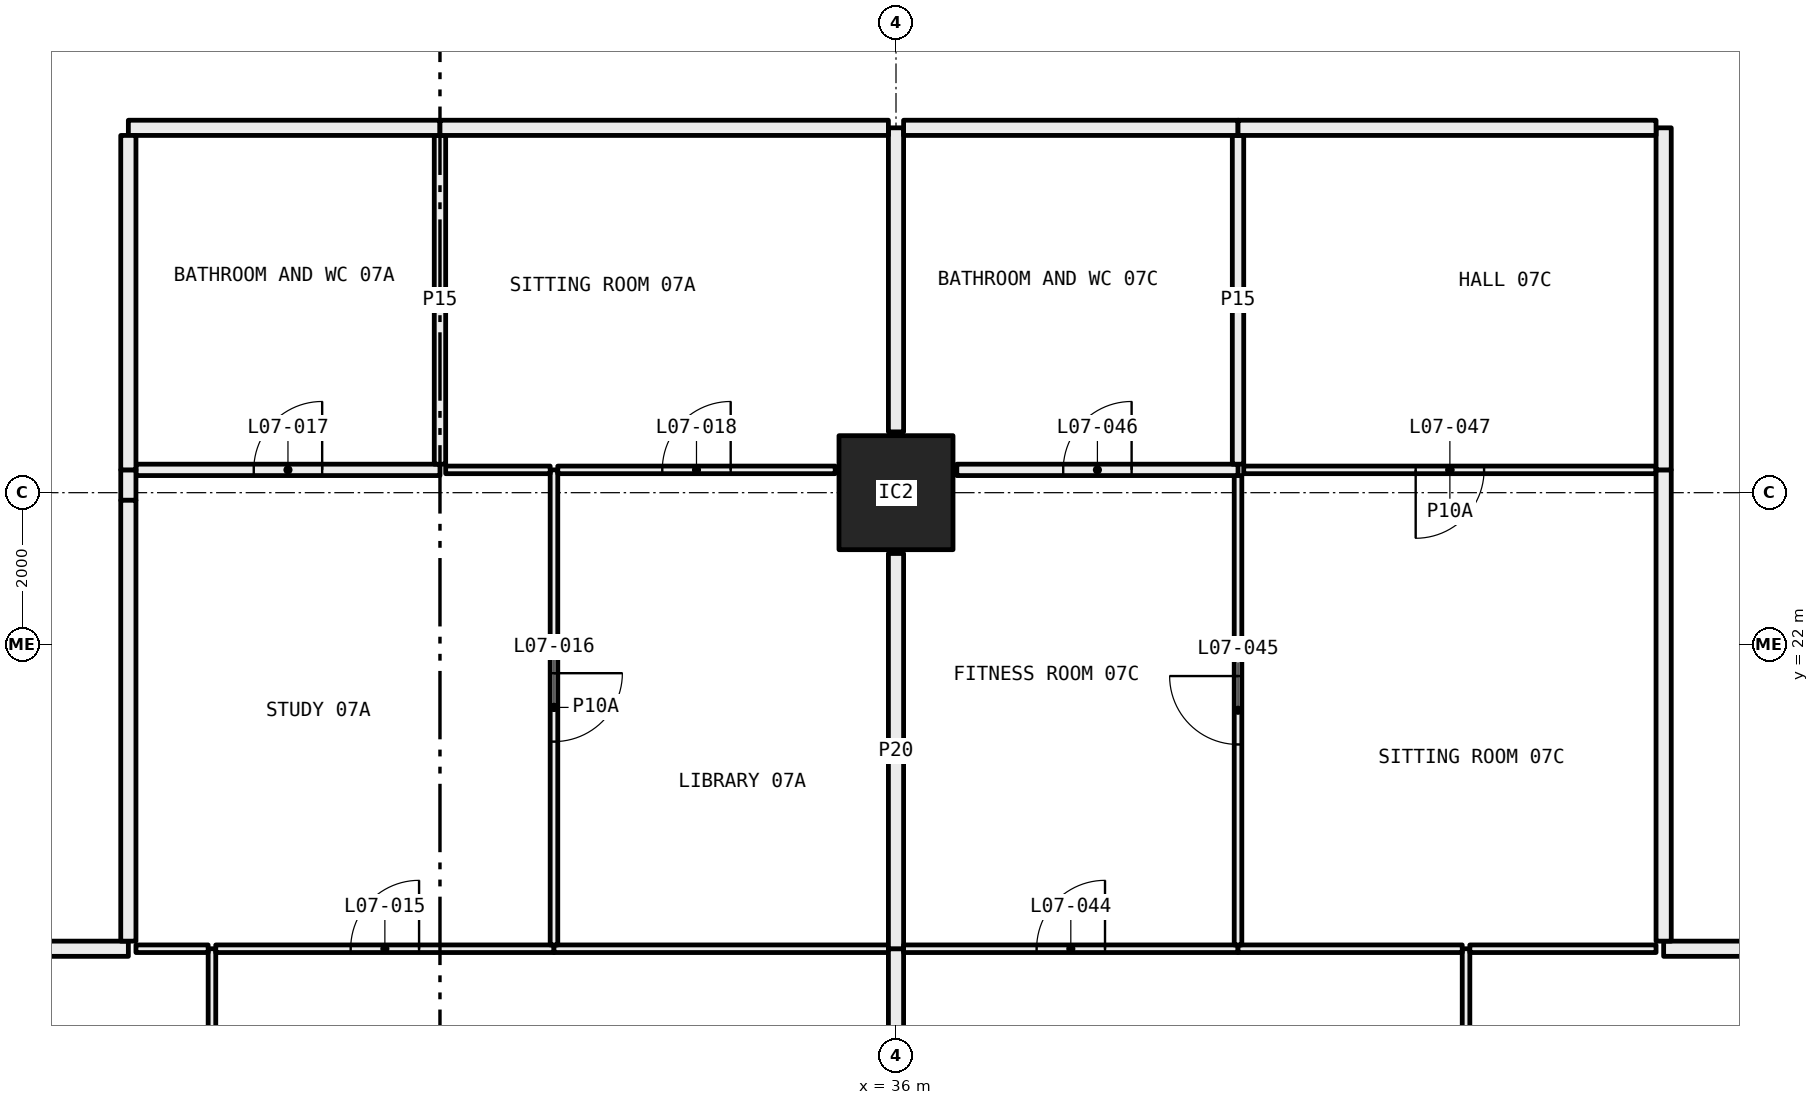
"""IFC4 building model, lengths in metres.
Left out: names, types, materials, properties, quantities, classifications, styles, units other than length and angle.
Written with IfcOpenShell. Run it as: python <this file> out.ifc"""

import sys

from ifc_helpers import new_model, si_unit, direction, frame, frame_2d, origin, origin_2d, place, context, subcontext, project, spatial, rectangle, hollow_rectangle, extrude, element, fill, save


model = new_model("IFC4")
c1 = context("Model", 3, precision=1e-05, world=origin(), true_north=direction((0.0, 1.0)))
c2 = subcontext(c1, "Body", "Model", "MODEL_VIEW")
j1 = project(units=[si_unit("LENGTHUNIT", "METRE"), si_unit("PLANEANGLEUNIT", "RADIAN")], contexts=[c1])
p1 = place(None, origin())
s1 = spatial("IfcSite", under=j1, at=p1, CompositionType="ELEMENT")
p2 = place(p1, origin())
s2 = spatial("IfcBuilding", under=s1, at=p2, CompositionType="ELEMENT")
p3 = place(p2, frame((0.0, 0.0, 36.9)))
s3 = spatial("IfcBuildingStorey", under=s2, at=p3, CompositionType="ELEMENT", Elevation=36.9)
p4 = place(p3, frame((36.0, 24.0, 0.0), z_axis=(0.0, 0.0, 1.0), x_axis=(1.0, 0.0, 0.0)))
e1 = element("IfcColumn", 1, at=p4, inside=s3, PredefinedType="COLUMN", context=c2, shape_type="SweptSolid", body=[
    extrude(hollow_rectangle(XDim=1.5, YDim=1.5, WallThickness=0.065, at=origin_2d()), origin(), (0.0, 0.0, 1.0), 3.05),
])
p5 = place(p3, frame((27.0, 12.05, 0.0), z_axis=(0.0, 0.0, 1.0), x_axis=(0.0, 1.0, 0.0)))
e2 = element("IfcWall", 2, at=p5, inside=s3, PredefinedType="PARTITIONING", context=c2, shape_type="SweptSolid", body=[
    extrude(rectangle(XDim=5.95, YDim=0.1, at=frame_2d((2.975, 0.0))), origin(), (0.0, 0.0, 1.0), 2.45),
])
p6 = place(p3, frame((26.95, 18.0, 0.0), z_axis=(0.0, 0.0, 1.0), x_axis=(-1.0, 0.0, 0.0)))
e3 = element("IfcWall", 3, at=p6, inside=s3, PredefinedType="PARTITIONING", context=c2, shape_type="SweptSolid", body=[
    extrude(rectangle(XDim=0.95, YDim=0.1, at=frame_2d((0.475, 0.0))), origin(), (0.0, 0.0, 1.0), 3.05),
])
p7 = place(p3, frame((25.9, 18.0, 0.0), z_axis=(0.0, 0.0, 1.0), x_axis=(-1.0, 0.0, 0.0)))
e4 = element("IfcWall", 4, at=p7, inside=s3, PredefinedType="PARTITIONING", context=c2, shape_type="SweptSolid", body=[
    extrude(rectangle(XDim=7.9, YDim=0.2, at=frame_2d((3.95, 0.0))), origin(), (0.0, 0.0, 1.0), 3.05),
])
p8 = place(p3, frame((31.5, 18.0, 0.0), z_axis=(0.0, 0.0, 1.0), x_axis=(-1.0, 0.0, 0.0)))
e5 = element("IfcWall", 5, at=p8, inside=s3, PredefinedType="PARTITIONING", context=c2, shape_type="SweptSolid", body=[
    extrude(rectangle(XDim=4.45, YDim=0.1, at=frame_2d((2.225, 0.0))), origin(), (0.0, 0.0, 1.0), 3.05),
])
p9 = place(p8, frame((1.775, 0.0, 0.0)))
e6 = element("IfcOpeningElement", 6, at=p9, cuts=e5, PredefinedType="OPENING", context=c2, shape_type="SweptSolid", body=[
    extrude(rectangle(XDim=0.9, YDim=2.1, at=frame_2d((0.45, 1.05))), frame((0.0, 0.06, 0.0), z_axis=(0.0, -1.0, 0.0), x_axis=(1.0, 0.0, 0.0)), (0.0, 0.0, 1.0), 0.12),
])
p10 = place(p3, frame((35.9, 18.0, 0.0), z_axis=(0.0, 0.0, 1.0), x_axis=(-1.0, 0.0, 0.0)))
e7 = element("IfcWall", 7, at=p10, inside=s3, PredefinedType="PARTITIONING", context=c2, shape_type="SweptSolid", body=[
    extrude(rectangle(XDim=4.4, YDim=0.1, at=frame_2d((2.2, 0.0))), origin(), (0.0, 0.0, 1.0), 3.05),
])
p11 = place(p3, frame((36.0, 12.8, 0.0), z_axis=(0.0, 0.0, 1.0), x_axis=(0.0, 1.0, 0.0)))
e8 = element("IfcWall", 8, at=p11, inside=s3, PredefinedType="PARTITIONING", context=c2, shape_type="SweptSolid", body=[
    extrude(rectangle(XDim=5.2, YDim=0.2, at=frame_2d((2.6, 0.0))), origin(), (0.0, 0.0, 1.0), 2.45),
])
p12 = place(p3, frame((31.5, 18.05, 0.0), z_axis=(0.0, 0.0, 1.0), x_axis=(0.0, 1.0, 0.0)))
e9 = element("IfcWall", 9, at=p12, inside=s3, PredefinedType="PARTITIONING", context=c2, shape_type="SweptSolid", body=[
    extrude(rectangle(XDim=6.25, YDim=0.1, at=frame_2d((3.125, 0.0))), origin(), (0.0, 0.0, 1.0), 2.45),
])
p13 = place(p12, frame((2.675, 0.0, 0.0)))
e10 = element("IfcOpeningElement", 10, at=p13, cuts=e9, PredefinedType="OPENING", context=c2, shape_type="SweptSolid", body=[
    extrude(rectangle(XDim=0.9, YDim=2.1, at=frame_2d((0.45, 1.05))), frame((0.0, 0.06, 0.0), z_axis=(0.0, -1.0, 0.0), x_axis=(1.0, 0.0, 0.0)), (0.0, 0.0, 1.0), 0.12),
])
p14 = place(p3, frame((30.0, 24.3, 0.0), z_axis=(0.0, 0.0, 1.0), x_axis=(-1.0, 0.0, 0.0)))
e11 = element("IfcWall", 11, at=p14, inside=s3, PredefinedType="PARTITIONING", context=c2, shape_type="SweptSolid", body=[
    extrude(rectangle(XDim=4.0, YDim=0.15, at=frame_2d((2.0, 0.0))), origin(), (0.0, 0.0, 1.0), 3.05),
])
p15 = place(p14, frame((1.55, 0.0, 0.0)))
e12 = element("IfcOpeningElement", 12, at=p15, cuts=e11, PredefinedType="OPENING", context=c2, shape_type="SweptSolid", body=[
    extrude(rectangle(XDim=0.9, YDim=2.1, at=frame_2d((0.45, 1.05))), frame((0.0, 0.085, 0.0), z_axis=(0.0, -1.0, 0.0), x_axis=(1.0, 0.0, 0.0)), (0.0, 0.0, 1.0), 0.17),
])
p16 = place(p3, frame((31.45, 24.3, 0.0), z_axis=(0.0, 0.0, 1.0), x_axis=(-1.0, 0.0, 0.0)))
e13 = element("IfcWall", 13, at=p16, inside=s3, PredefinedType="PARTITIONING", context=c2, shape_type="SweptSolid", body=[
    extrude(rectangle(XDim=1.375, YDim=0.1, at=frame_2d((0.688, 0.0))), origin(), (0.0, 0.0, 1.0), 3.05),
])
p17 = place(p3, frame((25.9, 24.3, 0.0), z_axis=(0.0, 0.0, 1.0), x_axis=(0.0, -1.0, 0.0)))
e14 = element("IfcWall", 14, at=p17, inside=s3, PredefinedType="PARTITIONING", context=c2, shape_type="SweptSolid", body=[
    extrude(rectangle(XDim=0.4, YDim=0.2, at=frame_2d((0.2, 0.0))), origin(), (0.0, 0.0, 1.0), 2.45),
])
p18 = place(p3, frame((25.9, 23.9, 0.0), z_axis=(0.0, 0.0, 1.0), x_axis=(0.0, -1.0, 0.0)))
e15 = element("IfcWall", 15, at=p18, inside=s3, PredefinedType="PARTITIONING", context=c2, shape_type="SweptSolid", body=[
    extrude(rectangle(XDim=5.8, YDim=0.2, at=frame_2d((2.9, 0.0))), origin(), (0.0, 0.0, 1.0), 3.05),
])
p19 = place(p3, frame((35.2, 24.3, 0.0), z_axis=(0.0, 0.0, 1.0), x_axis=(-1.0, 0.0, 0.0)))
e16 = element("IfcWall", 16, at=p19, inside=s3, PredefinedType="PARTITIONING", context=c2, shape_type="SweptSolid", body=[
    extrude(rectangle(XDim=3.65, YDim=0.1, at=frame_2d((1.825, 0.0))), origin(), (0.0, 0.0, 1.0), 3.05),
])
p20 = place(p19, frame((1.375, 0.0, 0.0)))
e17 = element("IfcOpeningElement", 17, at=p20, cuts=e16, PredefinedType="OPENING", context=c2, shape_type="SweptSolid", body=[
    extrude(rectangle(XDim=0.9, YDim=2.1, at=frame_2d((0.45, 1.05))), frame((0.0, 0.06, 0.0), z_axis=(0.0, -1.0, 0.0), x_axis=(1.0, 0.0, 0.0)), (0.0, 0.0, 1.0), 0.12),
])
p21 = place(p3, frame((36.0, 18.0, 0.0), z_axis=(0.0, 0.0, 1.0), x_axis=(0.0, 1.0, 0.0)))
e18 = element("IfcWall", 18, at=p21, inside=s3, PredefinedType="PARTITIONING", context=c2, shape_type="SweptSolid", body=[
    extrude(rectangle(XDim=5.2, YDim=0.2, at=frame_2d((2.6, 0.0))), origin(), (0.0, 0.0, 1.0), 2.45),
])
p22 = place(p3, frame((30.0, 24.375, 0.0), z_axis=(0.0, 0.0, 1.0), x_axis=(0.0, 1.0, 0.0)))
e19 = element("IfcWall", 19, at=p22, inside=s3, PredefinedType="PARTITIONING", context=c2, shape_type="SweptSolid", body=[
    extrude(rectangle(XDim=4.325, YDim=0.15, at=frame_2d((2.163, 0.0))), origin(), (0.0, 0.0, 1.0), 3.05),
])
p23 = place(p3, frame((30.0, 28.8, 0.0), z_axis=(0.0, 0.0, 1.0), x_axis=(-1.0, 0.0, 0.0)))
e20 = element("IfcWall", 20, at=p23, inside=s3, PredefinedType="PARTITIONING", context=c2, shape_type="SweptSolid", body=[
    extrude(rectangle(XDim=4.1, YDim=0.2, at=frame_2d((2.05, 0.0))), origin(), (0.0, 0.0, 1.0), 3.05),
])
p24 = place(p3, frame((25.9, 28.7, 0.0), z_axis=(0.0, 0.0, 1.0), x_axis=(0.0, -1.0, 0.0)))
e21 = element("IfcWall", 21, at=p24, inside=s3, PredefinedType="PARTITIONING", context=c2, shape_type="SweptSolid", body=[
    extrude(rectangle(XDim=4.4, YDim=0.2, at=frame_2d((2.2, 0.0))), origin(), (0.0, 0.0, 1.0), 3.05),
])
p25 = place(p3, frame((36.0, 24.8, 0.0), z_axis=(0.0, 0.0, 1.0), x_axis=(0.0, 1.0, 0.0)))
e22 = element("IfcWall", 22, at=p25, inside=s3, PredefinedType="PARTITIONING", context=c2, shape_type="SweptSolid", body=[
    extrude(rectangle(XDim=4.0, YDim=0.2, at=frame_2d((2.0, 0.0))), origin(), (0.0, 0.0, 1.0), 2.45),
])
p26 = place(p3, frame((35.9, 28.8, 0.0), z_axis=(0.0, 0.0, 1.0), x_axis=(-1.0, 0.0, 0.0)))
e23 = element("IfcWall", 23, at=p26, inside=s3, PredefinedType="PARTITIONING", context=c2, shape_type="SweptSolid", body=[
    extrude(rectangle(XDim=5.9, YDim=0.2, at=frame_2d((2.95, 0.0))), origin(), (0.0, 0.0, 1.0), 3.05),
])
p27 = place(p3, frame((43.5, 12.05, 0.0), z_axis=(0.0, 0.0, 1.0), x_axis=(0.0, 1.0, 0.0)))
e24 = element("IfcWall", 24, at=p27, inside=s3, PredefinedType="PARTITIONING", context=c2, shape_type="SweptSolid", body=[
    extrude(rectangle(XDim=5.95, YDim=0.1, at=frame_2d((2.975, 0.0))), origin(), (0.0, 0.0, 1.0), 2.45),
])
p28 = place(p3, frame((40.5, 18.0, 0.0), z_axis=(0.0, 0.0, 1.0), x_axis=(-1.0, 0.0, 0.0)))
e25 = element("IfcWall", 25, at=p28, inside=s3, PredefinedType="PARTITIONING", context=c2, shape_type="SweptSolid", body=[
    extrude(rectangle(XDim=4.4, YDim=0.1, at=frame_2d((2.2, 0.0))), origin(), (0.0, 0.0, 1.0), 3.05),
])
p29 = place(p28, frame((1.75, 0.0, 0.0)))
e26 = element("IfcOpeningElement", 26, at=p29, cuts=e25, PredefinedType="OPENING", context=c2, shape_type="SweptSolid", body=[
    extrude(rectangle(XDim=0.9, YDim=2.1, at=frame_2d((0.45, 1.05))), frame((0.0, 0.06, 0.0), z_axis=(0.0, -1.0, 0.0), x_axis=(1.0, 0.0, 0.0)), (0.0, 0.0, 1.0), 0.12),
])
p30 = place(p3, frame((43.45, 18.0, 0.0), z_axis=(0.0, 0.0, 1.0), x_axis=(-1.0, 0.0, 0.0)))
e27 = element("IfcWall", 27, at=p30, inside=s3, PredefinedType="PARTITIONING", context=c2, shape_type="SweptSolid", body=[
    extrude(rectangle(XDim=2.95, YDim=0.1, at=frame_2d((1.475, 0.0))), origin(), (0.0, 0.0, 1.0), 3.05),
])
p31 = place(p3, frame((46.0, 18.0, 0.0), z_axis=(0.0, 0.0, 1.0), x_axis=(-1.0, 0.0, 0.0)))
e28 = element("IfcWall", 28, at=p31, inside=s3, PredefinedType="PARTITIONING", context=c2, shape_type="SweptSolid", body=[
    extrude(rectangle(XDim=2.45, YDim=0.1, at=frame_2d((1.225, 0.0))), origin(), (0.0, 0.0, 1.0), 3.05),
])
p32 = place(p3, frame((51.0, 18.0, 0.0), z_axis=(0.0, 0.0, 1.0), x_axis=(-1.0, 0.0, 0.0)))
e29 = element("IfcWall", 29, at=p32, inside=s3, PredefinedType="PARTITIONING", context=c2, shape_type="SweptSolid", body=[
    extrude(rectangle(XDim=4.9, YDim=0.2, at=frame_2d((2.45, 0.0))), origin(), (0.0, 0.0, 1.0), 3.05),
])
p33 = place(p3, frame((40.5, 18.05, 0.0), z_axis=(0.0, 0.0, 1.0), x_axis=(0.0, 1.0, 0.0)))
e30 = element("IfcWall", 30, at=p33, inside=s3, PredefinedType="PARTITIONING", context=c2, shape_type="SweptSolid", body=[
    extrude(rectangle(XDim=6.175, YDim=0.1, at=frame_2d((3.087, 0.0))), origin(), (0.0, 0.0, 1.0), 2.45),
])
p34 = place(p33, frame((2.637, 0.0, 0.0)))
e31 = element("IfcOpeningElement", 31, at=p34, cuts=e30, PredefinedType="OPENING", context=c2, shape_type="SweptSolid", body=[
    extrude(rectangle(XDim=0.9, YDim=2.1, at=frame_2d((0.45, 1.05))), frame((0.0, 0.06, 0.0), z_axis=(0.0, -1.0, 0.0), x_axis=(1.0, 0.0, 0.0)), (0.0, 0.0, 1.0), 0.12),
])
p35 = place(p3, frame((40.5, 24.3, 0.0), z_axis=(0.0, 0.0, 1.0), x_axis=(-1.0, 0.0, 0.0)))
e32 = element("IfcWall", 32, at=p35, inside=s3, PredefinedType="PARTITIONING", context=c2, shape_type="SweptSolid", body=[
    extrude(rectangle(XDim=3.7, YDim=0.15, at=frame_2d((1.85, 0.0))), origin(), (0.0, 0.0, 1.0), 3.05),
])
p36 = place(p35, frame((1.4, 0.0, 0.0)))
e33 = element("IfcOpeningElement", 33, at=p36, cuts=e32, PredefinedType="OPENING", context=c2, shape_type="SweptSolid", body=[
    extrude(rectangle(XDim=0.9, YDim=2.1, at=frame_2d((0.45, 1.05))), frame((0.0, 0.085, 0.0), z_axis=(0.0, -1.0, 0.0), x_axis=(1.0, 0.0, 0.0)), (0.0, 0.0, 1.0), 0.17),
])
p37 = place(p3, frame((46.0, 24.3, 0.0), z_axis=(0.0, 0.0, 1.0), x_axis=(-1.0, 0.0, 0.0)))
e34 = element("IfcWall", 34, at=p37, inside=s3, PredefinedType="PARTITIONING", context=c2, shape_type="SweptSolid", body=[
    extrude(rectangle(XDim=5.425, YDim=0.1, at=frame_2d((2.712, 0.0))), origin(), (0.0, 0.0, 1.0), 3.05),
])
p38 = place(p37, frame((2.262, 0.0, 0.0)))
e35 = element("IfcOpeningElement", 35, at=p38, cuts=e34, PredefinedType="OPENING", context=c2, shape_type="SweptSolid", body=[
    extrude(rectangle(XDim=0.9, YDim=2.1, at=frame_2d((0.45, 1.05))), frame((0.0, 0.06, 0.0), z_axis=(0.0, -1.0, 0.0), x_axis=(1.0, 0.0, 0.0)), (0.0, 0.0, 1.0), 0.12),
])
p39 = place(p3, frame((46.1, 18.1, 0.0), z_axis=(0.0, 0.0, 1.0), x_axis=(0.0, 1.0, 0.0)))
e36 = element("IfcWall", 36, at=p39, inside=s3, PredefinedType="PARTITIONING", context=c2, shape_type="SweptSolid", body=[
    extrude(rectangle(XDim=6.2, YDim=0.2, at=frame_2d((3.1, 0.0))), origin(), (0.0, 0.0, 1.0), 2.45),
])
p40 = place(p3, frame((40.5, 24.375, 0.0), z_axis=(0.0, 0.0, 1.0), x_axis=(0.0, 1.0, 0.0)))
e37 = element("IfcWall", 37, at=p40, inside=s3, PredefinedType="PARTITIONING", context=c2, shape_type="SweptSolid", body=[
    extrude(rectangle(XDim=4.325, YDim=0.15, at=frame_2d((2.163, 0.0))), origin(), (0.0, 0.0, 1.0), 3.05),
])
p41 = place(p3, frame((40.5, 28.8, 0.0), z_axis=(0.0, 0.0, 1.0), x_axis=(-1.0, 0.0, 0.0)))
e38 = element("IfcWall", 38, at=p41, inside=s3, PredefinedType="PARTITIONING", context=c2, shape_type="SweptSolid", body=[
    extrude(rectangle(XDim=4.4, YDim=0.2, at=frame_2d((2.2, 0.0))), origin(), (0.0, 0.0, 1.0), 3.05),
])
p42 = place(p3, frame((46.1, 24.3, 0.0), z_axis=(0.0, 0.0, 1.0), x_axis=(0.0, 1.0, 0.0)))
e39 = element("IfcWall", 39, at=p42, inside=s3, PredefinedType="PARTITIONING", context=c2, shape_type="SweptSolid", body=[
    extrude(rectangle(XDim=4.5, YDim=0.2, at=frame_2d((2.25, 0.0))), origin(), (0.0, 0.0, 1.0), 3.05),
])
p43 = place(p3, frame((46.0, 28.8, 0.0), z_axis=(0.0, 0.0, 1.0), x_axis=(-1.0, 0.0, 0.0)))
e40 = element("IfcWall", 40, at=p43, inside=s3, PredefinedType="PARTITIONING", context=c2, shape_type="SweptSolid", body=[
    extrude(rectangle(XDim=5.5, YDim=0.2, at=frame_2d((2.75, 0.0))), origin(), (0.0, 0.0, 1.0), 3.05),
])
p44 = place(p9, frame((0.9, 0.0, 0.0), x_axis=(-1.0, 0.0, 0.0)))
e41 = element("IfcDoor", 41, at=p44, inside=s3, OperationType="SINGLE_SWING_LEFT", PredefinedType="DOOR", context=c2, shape_type="SweptSolid", body=[
    extrude(rectangle(XDim=0.9, YDim=2.1, at=frame_2d((0.45, 1.05))), frame((0.0, 0.025, 0.0), z_axis=(0.0, -1.0, 0.0), x_axis=(1.0, 0.0, 0.0)), (0.0, 0.0, 1.0), 0.05),
])
fill(e6, e41)
p45 = place(p13, frame((0.9, 0.0, 0.0), x_axis=(-1.0, 0.0, 0.0)))
e42 = element("IfcDoor", 42, at=p45, inside=s3, OperationType="SINGLE_SWING_RIGHT", PredefinedType="DOOR", context=c2, shape_type="SweptSolid", body=[
    extrude(rectangle(XDim=0.9, YDim=2.1, at=frame_2d((0.45, 1.05))), frame((0.0, 0.025, 0.0), z_axis=(0.0, -1.0, 0.0), x_axis=(1.0, 0.0, 0.0)), (0.0, 0.0, 1.0), 0.05),
])
fill(e10, e42)
p46 = place(p15, frame((0.9, 0.0, 0.0), x_axis=(-1.0, 0.0, 0.0)))
e43 = element("IfcDoor", 43, at=p46, inside=s3, OperationType="SINGLE_SWING_LEFT", PredefinedType="DOOR", context=c2, shape_type="SweptSolid", body=[
    extrude(rectangle(XDim=0.9, YDim=2.1, at=frame_2d((0.45, 1.05))), frame((0.0, 0.025, 0.0), z_axis=(0.0, -1.0, 0.0), x_axis=(1.0, 0.0, 0.0)), (0.0, 0.0, 1.0), 0.05),
])
fill(e12, e43)
p47 = place(p20, frame((0.9, 0.0, 0.0), x_axis=(-1.0, 0.0, 0.0)))
e44 = element("IfcDoor", 44, at=p47, inside=s3, OperationType="SINGLE_SWING_LEFT", PredefinedType="DOOR", context=c2, shape_type="SweptSolid", body=[
    extrude(rectangle(XDim=0.9, YDim=2.1, at=frame_2d((0.45, 1.05))), frame((0.0, 0.025, 0.0), z_axis=(0.0, -1.0, 0.0), x_axis=(1.0, 0.0, 0.0)), (0.0, 0.0, 1.0), 0.05),
])
fill(e17, e44)
p48 = place(p29, frame((0.9, 0.0, 0.0), x_axis=(-1.0, 0.0, 0.0)))
e45 = element("IfcDoor", 45, at=p48, inside=s3, OperationType="SINGLE_SWING_LEFT", PredefinedType="DOOR", context=c2, shape_type="SweptSolid", body=[
    extrude(rectangle(XDim=0.9, YDim=2.1, at=frame_2d((0.45, 1.05))), frame((0.0, 0.025, 0.0), z_axis=(0.0, -1.0, 0.0), x_axis=(1.0, 0.0, 0.0)), (0.0, 0.0, 1.0), 0.05),
])
fill(e26, e45)
p49 = place(p34, origin())
e46 = element("IfcDoor", 46, at=p49, inside=s3, OperationType="SINGLE_SWING_LEFT", PredefinedType="DOOR", context=c2, shape_type="SweptSolid", body=[
    extrude(rectangle(XDim=0.9, YDim=2.1, at=frame_2d((0.45, 1.05))), frame((0.0, 0.025, 0.0), z_axis=(0.0, -1.0, 0.0), x_axis=(1.0, 0.0, 0.0)), (0.0, 0.0, 1.0), 0.05),
])
fill(e31, e46)
p50 = place(p36, frame((0.9, 0.0, 0.0), x_axis=(-1.0, 0.0, 0.0)))
e47 = element("IfcDoor", 47, at=p50, inside=s3, OperationType="SINGLE_SWING_LEFT", PredefinedType="DOOR", context=c2, shape_type="SweptSolid", body=[
    extrude(rectangle(XDim=0.9, YDim=2.1, at=frame_2d((0.45, 1.05))), frame((0.0, 0.025, 0.0), z_axis=(0.0, -1.0, 0.0), x_axis=(1.0, 0.0, 0.0)), (0.0, 0.0, 1.0), 0.05),
])
fill(e33, e47)
p51 = place(p38, origin())
e48 = element("IfcDoor", 48, at=p51, inside=s3, OperationType="SINGLE_SWING_LEFT", PredefinedType="DOOR", context=c2, shape_type="SweptSolid", body=[
    extrude(rectangle(XDim=0.9, YDim=2.1, at=frame_2d((0.45, 1.05))), frame((0.0, 0.025, 0.0), z_axis=(0.0, -1.0, 0.0), x_axis=(1.0, 0.0, 0.0)), (0.0, 0.0, 1.0), 0.05),
])
fill(e35, e48)
save(model, sys.argv[1])
